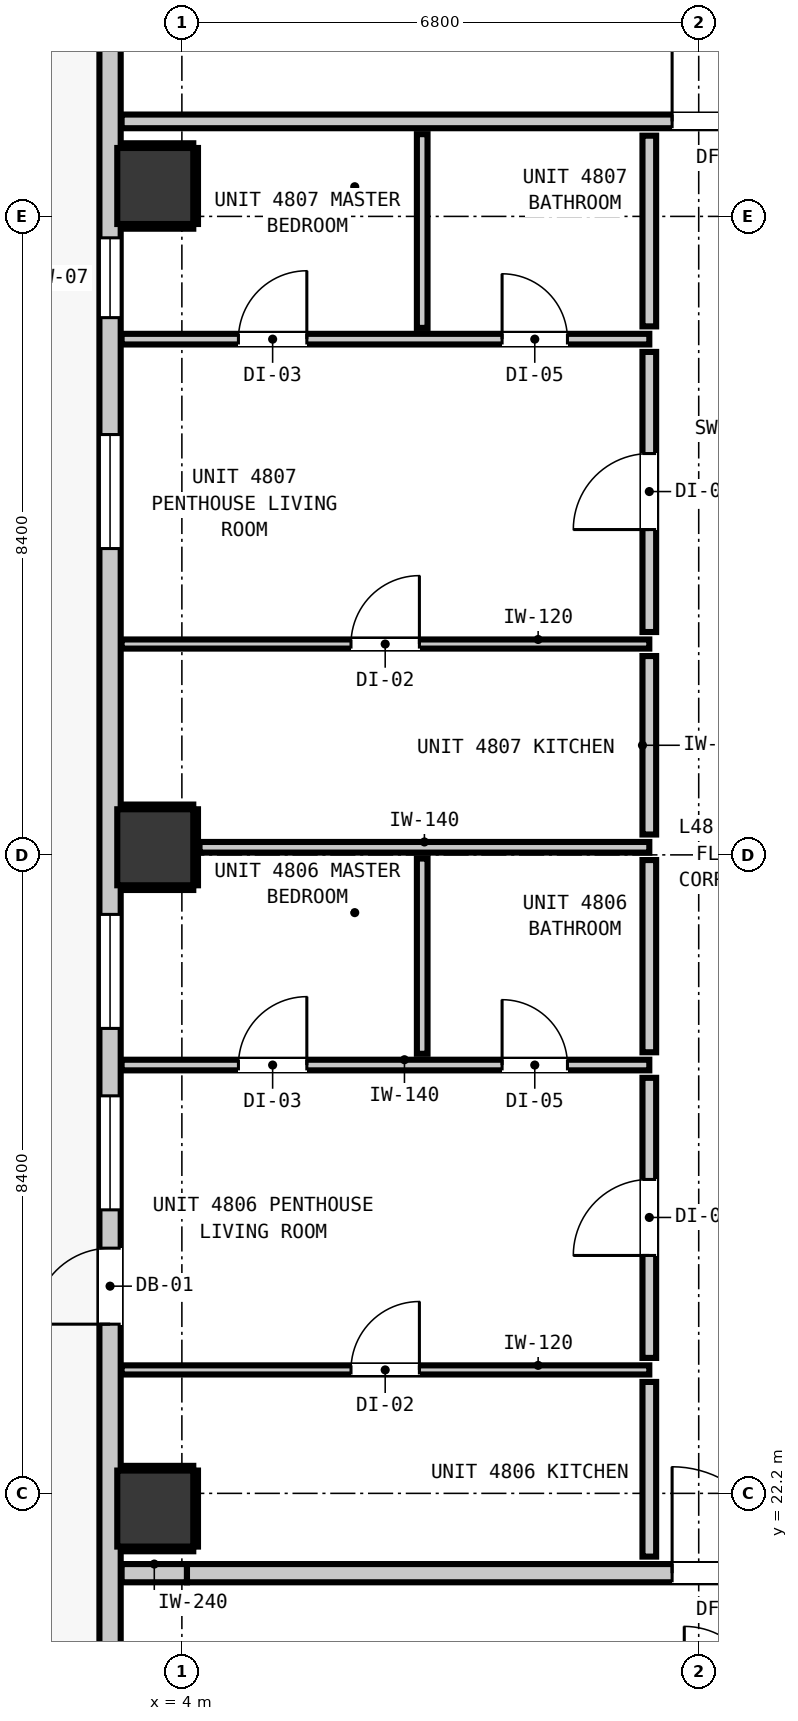
"""IFC4 building model, lengths in metres.
Left out: names, types, materials, properties, quantities, classifications, styles, units other than length and angle.
Written with IfcOpenShell. Run it as: python <this file> out.ifc"""

import sys

from ifc_helpers import new_model, si_unit, direction, frame, frame_2d, origin, origin_2d, place, context, subcontext, project, spatial, rectangle, extrude, element, fill, save


model = new_model("IFC4")
c1 = context("Model", 3, precision=1e-05, world=origin(), true_north=direction((0.0, 1.0)))
c2 = subcontext(c1, "Body", "Model", "MODEL_VIEW")
j1 = project(units=[si_unit("LENGTHUNIT", "METRE"), si_unit("PLANEANGLEUNIT", "RADIAN")], contexts=[c1])
p1 = place(None, origin())
s1 = spatial("IfcSite", under=j1, at=p1, CompositionType="ELEMENT")
p2 = place(p1, origin())
s2 = spatial("IfcBuilding", under=s1, at=p2, CompositionType="ELEMENT")
p3 = place(p2, frame((0.0, 0.0, 165.84)))
s3 = spatial("IfcBuildingStorey", under=s2, at=p3, CompositionType="ELEMENT", Elevation=165.84)
for number, where, z_axis, x_axis in (
    (1, (3.65, 22.0, -0.2), (0.0, 0.0, 1.0), (1.0, 0.0, 0.0)),
    (2, (3.65, 30.7, -0.2), (0.0, 0.0, 1.0), (1.0, 0.0, 0.0)),
    (3, (3.65, 39.4, -0.2), (0.0, 0.0, 1.0), (1.0, 0.0, 0.0)),
):
    element("IfcColumn", number, at=place(p3, frame(where, z_axis=z_axis, x_axis=x_axis)), inside=s3, PredefinedType="COLUMN", context=c2, shape_type="SweptSolid", body=[
        extrude(rectangle(XDim=1.0, YDim=1.0, at=origin_2d()), origin(), (0.0, 0.0, 1.0), 3.52),
    ])
p4 = place(p3, frame((3.055, 17.555, 0.0), z_axis=(0.0, 0.0, 1.0), x_axis=(0.0, 1.0, 0.0)))
e4 = element("IfcWall", 4, at=p4, inside=s3, PredefinedType="STANDARD", context=c2, shape_type="SweptSolid", body=[
    extrude(rectangle(XDim=32.29, YDim=0.28, at=frame_2d((16.145, 0.0))), origin(), (0.0, 0.0, 1.0), 3.08),
])
p5 = place(p4, frame((6.871, 0.0, 0.0)))
e5 = element("IfcOpeningElement", 5, at=p5, cuts=e4, PredefinedType="OPENING", context=c2, shape_type="SweptSolid", body=[
    extrude(rectangle(XDim=1.0, YDim=2.15, at=frame_2d((0.5, 1.075))), frame((0.0, 0.15, 0.0), z_axis=(0.0, -1.0, 0.0), x_axis=(1.0, 0.0, 0.0)), (0.0, 0.0, 1.0), 0.3),
])
p6 = place(p4, frame((30.527, 0.0, 0.85)))
e6 = element("IfcOpeningElement", 6, at=p6, cuts=e4, PredefinedType="OPENING", context=c2, shape_type="SweptSolid", body=[
    extrude(rectangle(XDim=1.5, YDim=1.8, at=frame_2d((0.75, 0.9))), frame((0.0, 0.15, 0.0), z_axis=(0.0, -1.0, 0.0), x_axis=(1.0, 0.0, 0.0)), (0.0, 0.0, 1.0), 0.3),
])
p7 = place(p4, frame((8.375, 0.0, 0.85)))
e7 = element("IfcOpeningElement", 7, at=p7, cuts=e4, PredefinedType="OPENING", context=c2, shape_type="SweptSolid", body=[
    extrude(rectangle(XDim=1.5, YDim=1.8, at=frame_2d((0.75, 0.9))), frame((0.0, 0.15, 0.0), z_axis=(0.0, -1.0, 0.0), x_axis=(1.0, 0.0, 0.0)), (0.0, 0.0, 1.0), 0.3),
])
p8 = place(p4, frame((10.762, 0.0, 0.85)))
e8 = element("IfcOpeningElement", 8, at=p8, cuts=e4, PredefinedType="OPENING", context=c2, shape_type="SweptSolid", body=[
    extrude(rectangle(XDim=1.5, YDim=1.8, at=frame_2d((0.75, 0.9))), frame((0.0, 0.15, 0.0), z_axis=(0.0, -1.0, 0.0), x_axis=(1.0, 0.0, 0.0)), (0.0, 0.0, 1.0), 0.3),
])
p9 = place(p4, frame((17.075, 0.0, 0.85)))
e9 = element("IfcOpeningElement", 9, at=p9, cuts=e4, PredefinedType="OPENING", context=c2, shape_type="SweptSolid", body=[
    extrude(rectangle(XDim=1.5, YDim=1.8, at=frame_2d((0.75, 0.9))), frame((0.0, 0.15, 0.0), z_axis=(0.0, -1.0, 0.0), x_axis=(1.0, 0.0, 0.0)), (0.0, 0.0, 1.0), 0.3),
])
p10 = place(p4, frame((20.113, 0.0, 0.85)))
e10 = element("IfcOpeningElement", 10, at=p10, cuts=e4, PredefinedType="OPENING", context=c2, shape_type="SweptSolid", body=[
    extrude(rectangle(XDim=1.05, YDim=1.65, at=frame_2d((0.525, 0.825))), frame((0.0, 0.15, 0.0), z_axis=(0.0, -1.0, 0.0), x_axis=(1.0, 0.0, 0.0)), (0.0, 0.0, 1.0), 0.3),
])
p11 = place(p3, frame((3.207, 21.15, 0.0), z_axis=(0.0, 0.0, 1.0), x_axis=(1.0, 0.0, 0.0)))
e11 = element("IfcWall", 11, at=p11, inside=s3, PredefinedType="PARTITIONING", context=c2, shape_type="SweptSolid", body=[
    extrude(rectangle(XDim=0.86, YDim=0.24, at=frame_2d((0.43, 0.0))), origin(), (0.0, 0.0, 1.0), 3.08),
])
p12 = place(p3, frame((4.067, 21.15, 0.0), z_axis=(0.0, 0.0, 1.0), x_axis=(1.0, 0.0, 0.0)))
e12 = element("IfcWall", 12, at=p12, inside=s3, PredefinedType="PARTITIONING", context=c2, shape_type="SweptSolid", body=[
    extrude(rectangle(XDim=8.916, YDim=0.24, at=frame_2d((4.458, 0.0))), origin(), (0.0, 0.0, 1.0), 2.565),
])
p13 = place(p12, frame((6.383, 0.0, 0.0)))
e13 = element("IfcOpeningElement", 13, at=p13, cuts=e12, PredefinedType="OPENING", context=c2, shape_type="SweptSolid", body=[
    extrude(rectangle(XDim=1.4, YDim=2.15, at=frame_2d((0.7, 1.075))), frame((0.0, 0.13, 0.0), z_axis=(0.0, -1.0, 0.0), x_axis=(1.0, 0.0, 0.0)), (0.0, 0.0, 1.0), 0.26),
])
p14 = place(p3, frame((3.207, 40.25, 0.0), z_axis=(0.0, 0.0, 1.0), x_axis=(1.0, 0.0, 0.0)))
e14 = element("IfcWall", 14, at=p14, inside=s3, PredefinedType="PARTITIONING", context=c2, shape_type="SweptSolid", body=[
    extrude(rectangle(XDim=39.386, YDim=0.18, at=frame_2d((19.693, 0.0))), origin(), (0.0, 0.0, 1.0), 3.08),
])
p15 = place(p14, frame((14.228, 0.0, 0.0)))
e15 = element("IfcOpeningElement", 15, at=p15, cuts=e14, PredefinedType="OPENING", context=c2, shape_type="SweptSolid", body=[
    extrude(rectangle(XDim=1.4, YDim=2.15, at=frame_2d((0.7, 1.075))), frame((0.0, 0.1, 0.0), z_axis=(0.0, -1.0, 0.0), x_axis=(1.0, 0.0, 0.0)), (0.0, 0.0, 1.0), 0.2),
])
p16 = place(p14, frame((7.243, 0.0, 0.0)))
e16 = element("IfcOpeningElement", 16, at=p16, cuts=e14, PredefinedType="OPENING", context=c2, shape_type="SweptSolid", body=[
    extrude(rectangle(XDim=1.4, YDim=2.15, at=frame_2d((0.7, 1.075))), frame((0.0, 0.1, 0.0), z_axis=(0.0, -1.0, 0.0), x_axis=(1.0, 0.0, 0.0)), (0.0, 0.0, 1.0), 0.2),
])
p17 = place(p14, frame((34.843, 0.0, 0.0)))
e17 = element("IfcOpeningElement", 17, at=p17, cuts=e14, PredefinedType="OPENING", context=c2, shape_type="SweptSolid", body=[
    extrude(rectangle(XDim=1.4, YDim=2.15, at=frame_2d((0.7, 1.075))), frame((0.0, 0.1, 0.0), z_axis=(0.0, -1.0, 0.0), x_axis=(1.0, 0.0, 0.0)), (0.0, 0.0, 1.0), 0.2),
])
p18 = place(p3, frame((3.207, 27.835, 0.0), z_axis=(0.0, 0.0, 1.0), x_axis=(1.0, 0.0, 0.0)))
e18 = element("IfcWall", 18, at=p18, inside=s3, PredefinedType="PARTITIONING", context=c2, shape_type="SweptSolid", body=[
    extrude(rectangle(XDim=6.943, YDim=0.14, at=frame_2d((3.471, 0.0))), origin(), (0.0, 0.0, 1.0), 3.08),
])
p19 = place(p18, frame((5.006, 0.0, 0.0)))
e19 = element("IfcOpeningElement", 19, at=p19, cuts=e18, PredefinedType="OPENING", context=c2, shape_type="SweptSolid", body=[
    extrude(rectangle(XDim=0.86, YDim=2.02, at=frame_2d((0.43, 1.01))), frame((0.0, 0.08, 0.0), z_axis=(0.0, -1.0, 0.0), x_axis=(1.0, 0.0, 0.0)), (0.0, 0.0, 1.0), 0.16),
])
p20 = place(p18, frame((1.537, 0.0, 0.0)))
e20 = element("IfcOpeningElement", 20, at=p20, cuts=e18, PredefinedType="OPENING", context=c2, shape_type="SweptSolid", body=[
    extrude(rectangle(XDim=0.9, YDim=2.1, at=frame_2d((0.45, 1.05))), frame((0.0, 0.08, 0.0), z_axis=(0.0, -1.0, 0.0), x_axis=(1.0, 0.0, 0.0)), (0.0, 0.0, 1.0), 0.16),
])
p21 = place(p3, frame((4.232, 30.7, 0.0), z_axis=(0.0, 0.0, 1.0), x_axis=(1.0, 0.0, 0.0)))
e21 = element("IfcWall", 21, at=p21, inside=s3, PredefinedType="PARTITIONING", context=c2, shape_type="SweptSolid", body=[
    extrude(rectangle(XDim=5.918, YDim=0.14, at=frame_2d((2.959, 0.0))), origin(), (0.0, 0.0, 1.0), 2.315),
])
p22 = place(p3, frame((3.207, 37.385, 0.0), z_axis=(0.0, 0.0, 1.0), x_axis=(1.0, 0.0, 0.0)))
e22 = element("IfcWall", 22, at=p22, inside=s3, PredefinedType="PARTITIONING", context=c2, shape_type="SweptSolid", body=[
    extrude(rectangle(XDim=6.943, YDim=0.14, at=frame_2d((3.471, 0.0))), origin(), (0.0, 0.0, 1.0), 3.08),
])
p23 = place(p22, frame((5.006, 0.0, 0.0)))
e23 = element("IfcOpeningElement", 23, at=p23, cuts=e22, PredefinedType="OPENING", context=c2, shape_type="SweptSolid", body=[
    extrude(rectangle(XDim=0.86, YDim=2.02, at=frame_2d((0.43, 1.01))), frame((0.0, 0.08, 0.0), z_axis=(0.0, -1.0, 0.0), x_axis=(1.0, 0.0, 0.0)), (0.0, 0.0, 1.0), 0.16),
])
p24 = place(p22, frame((1.537, 0.0, 0.0)))
e24 = element("IfcOpeningElement", 24, at=p24, cuts=e22, PredefinedType="OPENING", context=c2, shape_type="SweptSolid", body=[
    extrude(rectangle(XDim=0.9, YDim=2.1, at=frame_2d((0.45, 1.05))), frame((0.0, 0.08, 0.0), z_axis=(0.0, -1.0, 0.0), x_axis=(1.0, 0.0, 0.0)), (0.0, 0.0, 1.0), 0.16),
])
p25 = place(p3, frame((3.207, 23.824, 0.0), z_axis=(0.0, 0.0, 1.0), x_axis=(1.0, 0.0, 0.0)))
e25 = element("IfcWall", 25, at=p25, inside=s3, PredefinedType="PARTITIONING", context=c2, shape_type="SweptSolid", body=[
    extrude(rectangle(XDim=6.943, YDim=0.12, at=frame_2d((3.471, 0.0))), origin(), (0.0, 0.0, 1.0), 3.08),
])
p26 = place(p25, frame((3.018, 0.0, 0.0)))
e26 = element("IfcOpeningElement", 26, at=p26, cuts=e25, PredefinedType="OPENING", context=c2, shape_type="SweptSolid", body=[
    extrude(rectangle(XDim=0.9, YDim=2.1, at=frame_2d((0.45, 1.05))), frame((0.0, 0.07, 0.0), z_axis=(0.0, -1.0, 0.0), x_axis=(1.0, 0.0, 0.0)), (0.0, 0.0, 1.0), 0.14),
])
p27 = place(p3, frame((3.207, 33.374, 0.0), z_axis=(0.0, 0.0, 1.0), x_axis=(1.0, 0.0, 0.0)))
e27 = element("IfcWall", 27, at=p27, inside=s3, PredefinedType="PARTITIONING", context=c2, shape_type="SweptSolid", body=[
    extrude(rectangle(XDim=6.943, YDim=0.12, at=frame_2d((3.471, 0.0))), origin(), (0.0, 0.0, 1.0), 3.08),
])
p28 = place(p27, frame((3.018, 0.0, 0.0)))
e28 = element("IfcOpeningElement", 28, at=p28, cuts=e27, PredefinedType="OPENING", context=c2, shape_type="SweptSolid", body=[
    extrude(rectangle(XDim=0.9, YDim=2.1, at=frame_2d((0.45, 1.05))), frame((0.0, 0.07, 0.0), z_axis=(0.0, -1.0, 0.0), x_axis=(1.0, 0.0, 0.0)), (0.0, 0.0, 1.0), 0.14),
])
p29 = place(p3, frame((10.15, 21.368, 0.0), z_axis=(0.0, 0.0, 1.0), x_axis=(0.0, 1.0, 0.0)))
e29 = element("IfcWall", 29, at=p29, inside=s3, PredefinedType="PARTITIONING", context=c2, shape_type="SweptSolid", body=[
    extrude(rectangle(XDim=2.298, YDim=0.18, at=frame_2d((1.149, 0.0))), origin(), (0.0, 0.0, 1.0), 3.08),
])
p30 = place(p3, frame((10.15, 23.982, 0.0), z_axis=(0.0, 0.0, 1.0), x_axis=(0.0, 1.0, 0.0)))
e30 = element("IfcWall", 30, at=p30, inside=s3, PredefinedType="PARTITIONING", context=c2, shape_type="SweptSolid", body=[
    extrude(rectangle(XDim=3.685, YDim=0.18, at=frame_2d((1.843, 0.0))), origin(), (0.0, 0.0, 1.0), 3.08),
])
p31 = place(p30, frame((1.348, 0.0, 0.0)))
e31 = element("IfcOpeningElement", 31, at=p31, cuts=e30, PredefinedType="OPENING", context=c2, shape_type="SweptSolid", body=[
    extrude(rectangle(XDim=1.0, YDim=2.15, at=frame_2d((0.5, 1.075))), frame((0.0, 0.1, 0.0), z_axis=(0.0, -1.0, 0.0), x_axis=(1.0, 0.0, 0.0)), (0.0, 0.0, 1.0), 0.2),
])
p32 = place(p3, frame((10.15, 28.003, 0.0), z_axis=(0.0, 0.0, 1.0), x_axis=(0.0, 1.0, 0.0)))
e32 = element("IfcWall", 32, at=p32, inside=s3, PredefinedType="PARTITIONING", context=c2, shape_type="SweptSolid", body=[
    extrude(rectangle(XDim=2.529, YDim=0.18, at=frame_2d((1.265, 0.0))), origin(), (0.0, 0.0, 1.0), 3.08),
])
p33 = place(p3, frame((10.15, 30.868, 0.0), z_axis=(0.0, 0.0, 1.0), x_axis=(0.0, 1.0, 0.0)))
e33 = element("IfcWall", 33, at=p33, inside=s3, PredefinedType="PARTITIONING", context=c2, shape_type="SweptSolid", body=[
    extrude(rectangle(XDim=2.348, YDim=0.18, at=frame_2d((1.174, 0.0))), origin(), (0.0, 0.0, 1.0), 3.08),
])
p34 = place(p3, frame((10.15, 33.532, 0.0), z_axis=(0.0, 0.0, 1.0), x_axis=(0.0, 1.0, 0.0)))
e34 = element("IfcWall", 34, at=p34, inside=s3, PredefinedType="PARTITIONING", context=c2, shape_type="SweptSolid", body=[
    extrude(rectangle(XDim=3.685, YDim=0.18, at=frame_2d((1.843, 0.0))), origin(), (0.0, 0.0, 1.0), 3.08),
])
p35 = place(p34, frame((1.348, 0.0, 0.0)))
e35 = element("IfcOpeningElement", 35, at=p35, cuts=e34, PredefinedType="OPENING", context=c2, shape_type="SweptSolid", body=[
    extrude(rectangle(XDim=1.0, YDim=2.15, at=frame_2d((0.5, 1.075))), frame((0.0, 0.1, 0.0), z_axis=(0.0, -1.0, 0.0), x_axis=(1.0, 0.0, 0.0)), (0.0, 0.0, 1.0), 0.2),
])
p36 = place(p3, frame((10.15, 37.553, 0.0), z_axis=(0.0, 0.0, 1.0), x_axis=(0.0, 1.0, 0.0)))
e36 = element("IfcWall", 36, at=p36, inside=s3, PredefinedType="PARTITIONING", context=c2, shape_type="SweptSolid", body=[
    extrude(rectangle(XDim=2.509, YDim=0.18, at=frame_2d((1.254, 0.0))), origin(), (0.0, 0.0, 1.0), 3.08),
])
p37 = place(p3, frame((7.162, 27.983, 0.0), z_axis=(0.0, 0.0, 1.0), x_axis=(0.0, 1.0, 0.0)))
e37 = element("IfcWall", 37, at=p37, inside=s3, PredefinedType="PARTITIONING", context=c2, shape_type="SweptSolid", body=[
    extrude(rectangle(XDim=2.569, YDim=0.14, at=frame_2d((1.285, 0.0))), origin(), (0.0, 0.0, 1.0), 3.08),
])
p38 = place(p3, frame((7.162, 37.533, 0.0), z_axis=(0.0, 0.0, 1.0), x_axis=(0.0, 1.0, 0.0)))
e38 = element("IfcWall", 38, at=p38, inside=s3, PredefinedType="PARTITIONING", context=c2, shape_type="SweptSolid", body=[
    extrude(rectangle(XDim=2.549, YDim=0.14, at=frame_2d((1.274, 0.0))), origin(), (0.0, 0.0, 1.0), 3.08),
])
for number, where, z_axis, x_axis in (
    (39, (3.21, 21.468, 0.0), (0.0, 0.0, 1.0), (1.0, 0.0, 0.0)),
    (40, (3.21, 22.532, 0.0), (0.0, 0.0, 1.0), (1.0, 0.0, 0.0)),
):
    element("IfcWall", number, at=place(p3, frame(where, z_axis=z_axis, x_axis=x_axis)), inside=s3, PredefinedType="PARTITIONING", context=c2, shape_type="SweptSolid", body=[
        extrude(rectangle(XDim=0.94, YDim=0.06, at=frame_2d((0.47, 0.0))), origin(), (0.0, 0.0, 1.0), 1.45),
    ])
p39 = place(p3, frame((4.182, 21.5, 0.0), z_axis=(0.0, 0.0, 1.0), x_axis=(0.0, 1.0, 0.0)))
e41 = element("IfcWall", 41, at=p39, inside=s3, PredefinedType="PARTITIONING", context=c2, shape_type="SweptSolid", body=[
    extrude(rectangle(XDim=1.0, YDim=0.06, at=frame_2d((0.5, 0.0))), origin(), (0.0, 0.0, 1.0), 1.45),
])
for number, where, z_axis, x_axis in (
    (42, (3.21, 30.168, 0.0), (0.0, 0.0, 1.0), (1.0, 0.0, 0.0)),
    (43, (3.21, 31.232, 0.0), (0.0, 0.0, 1.0), (1.0, 0.0, 0.0)),
):
    element("IfcWall", number, at=place(p3, frame(where, z_axis=z_axis, x_axis=x_axis)), inside=s3, PredefinedType="PARTITIONING", context=c2, shape_type="SweptSolid", body=[
        extrude(rectangle(XDim=0.94, YDim=0.06, at=frame_2d((0.47, 0.0))), origin(), (0.0, 0.0, 1.0), 1.45),
    ])
p40 = place(p3, frame((4.182, 30.2, 0.0), z_axis=(0.0, 0.0, 1.0), x_axis=(0.0, 1.0, 0.0)))
e44 = element("IfcWall", 44, at=p40, inside=s3, PredefinedType="PARTITIONING", context=c2, shape_type="SweptSolid", body=[
    extrude(rectangle(XDim=1.0, YDim=0.06, at=frame_2d((0.5, 0.0))), origin(), (0.0, 0.0, 1.0), 1.45),
])
for number, where, z_axis, x_axis in (
    (45, (3.21, 38.868, 0.0), (0.0, 0.0, 1.0), (1.0, 0.0, 0.0)),
    (46, (3.21, 39.932, 0.0), (0.0, 0.0, 1.0), (1.0, 0.0, 0.0)),
):
    element("IfcWall", number, at=place(p3, frame(where, z_axis=z_axis, x_axis=x_axis)), inside=s3, PredefinedType="PARTITIONING", context=c2, shape_type="SweptSolid", body=[
        extrude(rectangle(XDim=0.94, YDim=0.06, at=frame_2d((0.47, 0.0))), origin(), (0.0, 0.0, 1.0), 1.45),
    ])
p41 = place(p3, frame((4.182, 38.9, 0.0), z_axis=(0.0, 0.0, 1.0), x_axis=(0.0, 1.0, 0.0)))
e47 = element("IfcWall", 47, at=p41, inside=s3, PredefinedType="PARTITIONING", context=c2, shape_type="SweptSolid", body=[
    extrude(rectangle(XDim=1.0, YDim=0.06, at=frame_2d((0.5, 0.0))), origin(), (0.0, 0.0, 1.0), 1.45),
])
p42 = place(p5, origin())
e48 = element("IfcDoor", 48, at=p42, inside=s3, OperationType="SINGLE_SWING_LEFT", PredefinedType="DOOR", context=c2, shape_type="SweptSolid", body=[
    extrude(rectangle(XDim=1.0, YDim=2.15, at=frame_2d((0.5, 1.075))), frame((0.0, 0.025, 0.0), z_axis=(0.0, -1.0, 0.0), x_axis=(1.0, 0.0, 0.0)), (0.0, 0.0, 1.0), 0.05),
])
fill(e5, e48)
p43 = place(p7, origin())
e49 = element("IfcWindow", 49, at=p43, inside=s3, PartitioningType="SINGLE_PANEL", PredefinedType="WINDOW", context=c2, shape_type="SweptSolid", body=[
    extrude(rectangle(XDim=1.5, YDim=1.8, at=frame_2d((0.75, 0.9))), frame((0.0, 0.03, 0.0), z_axis=(0.0, -1.0, 0.0), x_axis=(1.0, 0.0, 0.0)), (0.0, 0.0, 1.0), 0.06),
])
fill(e7, e49)
p44 = place(p8, origin())
e50 = element("IfcWindow", 50, at=p44, inside=s3, PartitioningType="SINGLE_PANEL", PredefinedType="WINDOW", context=c2, shape_type="SweptSolid", body=[
    extrude(rectangle(XDim=1.5, YDim=1.8, at=frame_2d((0.75, 0.9))), frame((0.0, 0.03, 0.0), z_axis=(0.0, -1.0, 0.0), x_axis=(1.0, 0.0, 0.0)), (0.0, 0.0, 1.0), 0.06),
])
fill(e8, e50)
p45 = place(p9, origin())
e51 = element("IfcWindow", 51, at=p45, inside=s3, PartitioningType="SINGLE_PANEL", PredefinedType="WINDOW", context=c2, shape_type="SweptSolid", body=[
    extrude(rectangle(XDim=1.5, YDim=1.8, at=frame_2d((0.75, 0.9))), frame((0.0, 0.03, 0.0), z_axis=(0.0, -1.0, 0.0), x_axis=(1.0, 0.0, 0.0)), (0.0, 0.0, 1.0), 0.06),
])
fill(e9, e51)
p46 = place(p10, origin())
e52 = element("IfcWindow", 52, at=p46, inside=s3, PartitioningType="SINGLE_PANEL", PredefinedType="WINDOW", context=c2, shape_type="SweptSolid", body=[
    extrude(rectangle(XDim=1.05, YDim=1.65, at=frame_2d((0.525, 0.825))), frame((0.0, 0.03, 0.0), z_axis=(0.0, -1.0, 0.0), x_axis=(1.0, 0.0, 0.0)), (0.0, 0.0, 1.0), 0.06),
])
fill(e10, e52)
p47 = place(p13, origin())
e53 = element("IfcDoor", 53, at=p47, inside=s3, OperationType="SINGLE_SWING_LEFT", PredefinedType="DOOR", context=c2, shape_type="SweptSolid", body=[
    extrude(rectangle(XDim=1.4, YDim=2.15, at=frame_2d((0.7, 1.075))), frame((0.0, 0.025, 0.0), z_axis=(0.0, -1.0, 0.0), x_axis=(1.0, 0.0, 0.0)), (0.0, 0.0, 1.0), 0.05),
])
fill(e13, e53)
p48 = place(p16, origin())
e54 = element("IfcDoor", 54, at=p48, inside=s3, OperationType="SINGLE_SWING_LEFT", PredefinedType="DOOR", context=c2, shape_type="SweptSolid", body=[
    extrude(rectangle(XDim=1.4, YDim=2.15, at=frame_2d((0.7, 1.075))), frame((0.0, 0.025, 0.0), z_axis=(0.0, -1.0, 0.0), x_axis=(1.0, 0.0, 0.0)), (0.0, 0.0, 1.0), 0.05),
])
fill(e16, e54)
p49 = place(p31, origin())
e55 = element("IfcDoor", 55, at=p49, inside=s3, OperationType="SINGLE_SWING_LEFT", PredefinedType="DOOR", context=c2, shape_type="SweptSolid", body=[
    extrude(rectangle(XDim=1.0, YDim=2.15, at=frame_2d((0.5, 1.075))), frame((0.0, 0.025, 0.0), z_axis=(0.0, -1.0, 0.0), x_axis=(1.0, 0.0, 0.0)), (0.0, 0.0, 1.0), 0.05),
])
fill(e31, e55)
p50 = place(p26, origin())
e56 = element("IfcDoor", 56, at=p50, inside=s3, OperationType="SINGLE_SWING_RIGHT", PredefinedType="DOOR", context=c2, shape_type="SweptSolid", body=[
    extrude(rectangle(XDim=0.9, YDim=2.1, at=frame_2d((0.45, 1.05))), frame((0.0, 0.025, 0.0), z_axis=(0.0, -1.0, 0.0), x_axis=(1.0, 0.0, 0.0)), (0.0, 0.0, 1.0), 0.05),
])
fill(e26, e56)
p51 = place(p19, origin())
e57 = element("IfcDoor", 57, at=p51, inside=s3, OperationType="SINGLE_SWING_LEFT", PredefinedType="DOOR", context=c2, shape_type="SweptSolid", body=[
    extrude(rectangle(XDim=0.86, YDim=2.02, at=frame_2d((0.43, 1.01))), frame((0.0, 0.025, 0.0), z_axis=(0.0, -1.0, 0.0), x_axis=(1.0, 0.0, 0.0)), (0.0, 0.0, 1.0), 0.05),
])
fill(e19, e57)
p52 = place(p20, origin())
e58 = element("IfcDoor", 58, at=p52, inside=s3, OperationType="SINGLE_SWING_RIGHT", PredefinedType="DOOR", context=c2, shape_type="SweptSolid", body=[
    extrude(rectangle(XDim=0.9, YDim=2.1, at=frame_2d((0.45, 1.05))), frame((0.0, 0.025, 0.0), z_axis=(0.0, -1.0, 0.0), x_axis=(1.0, 0.0, 0.0)), (0.0, 0.0, 1.0), 0.05),
])
fill(e20, e58)
p53 = place(p35, origin())
e59 = element("IfcDoor", 59, at=p53, inside=s3, OperationType="SINGLE_SWING_LEFT", PredefinedType="DOOR", context=c2, shape_type="SweptSolid", body=[
    extrude(rectangle(XDim=1.0, YDim=2.15, at=frame_2d((0.5, 1.075))), frame((0.0, 0.025, 0.0), z_axis=(0.0, -1.0, 0.0), x_axis=(1.0, 0.0, 0.0)), (0.0, 0.0, 1.0), 0.05),
])
fill(e35, e59)
p54 = place(p28, origin())
e60 = element("IfcDoor", 60, at=p54, inside=s3, OperationType="SINGLE_SWING_RIGHT", PredefinedType="DOOR", context=c2, shape_type="SweptSolid", body=[
    extrude(rectangle(XDim=0.9, YDim=2.1, at=frame_2d((0.45, 1.05))), frame((0.0, 0.025, 0.0), z_axis=(0.0, -1.0, 0.0), x_axis=(1.0, 0.0, 0.0)), (0.0, 0.0, 1.0), 0.05),
])
fill(e28, e60)
p55 = place(p23, origin())
e61 = element("IfcDoor", 61, at=p55, inside=s3, OperationType="SINGLE_SWING_LEFT", PredefinedType="DOOR", context=c2, shape_type="SweptSolid", body=[
    extrude(rectangle(XDim=0.86, YDim=2.02, at=frame_2d((0.43, 1.01))), frame((0.0, 0.025, 0.0), z_axis=(0.0, -1.0, 0.0), x_axis=(1.0, 0.0, 0.0)), (0.0, 0.0, 1.0), 0.05),
])
fill(e23, e61)
p56 = place(p24, origin())
e62 = element("IfcDoor", 62, at=p56, inside=s3, OperationType="SINGLE_SWING_RIGHT", PredefinedType="DOOR", context=c2, shape_type="SweptSolid", body=[
    extrude(rectangle(XDim=0.9, YDim=2.1, at=frame_2d((0.45, 1.05))), frame((0.0, 0.025, 0.0), z_axis=(0.0, -1.0, 0.0), x_axis=(1.0, 0.0, 0.0)), (0.0, 0.0, 1.0), 0.05),
])
fill(e24, e62)
save(model, sys.argv[1])
